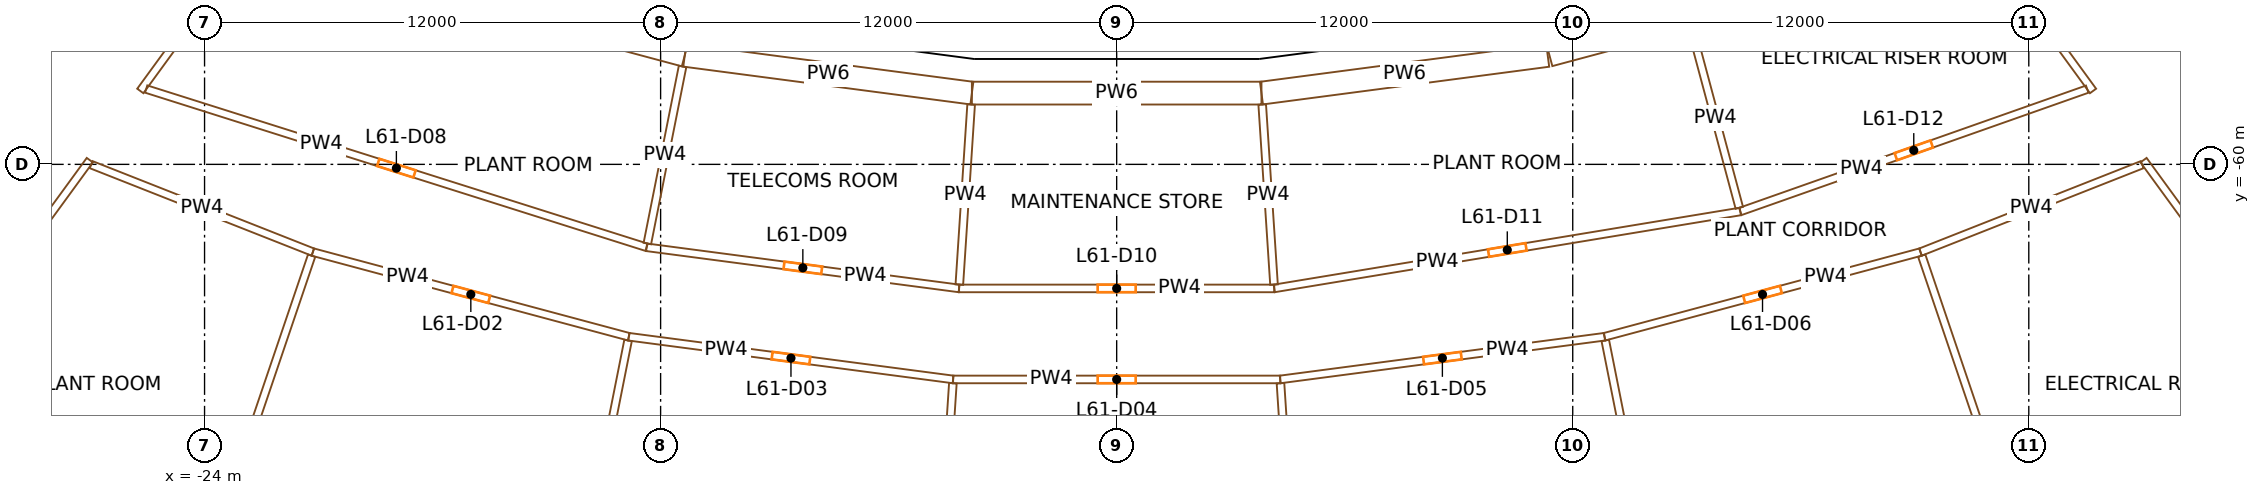
"""IFC4 building model, lengths in metres.
Left out: names, types, materials, properties, quantities, classifications, styles, units other than length and angle.
Written with IfcOpenShell. Run it as: python <this file> out.ifc"""

import sys

from ifc_helpers import new_model, si_unit, direction, frame, frame_2d, origin, origin_2d, place, context, subcontext, project, spatial, rectangle, extrude, element, fill, save


model = new_model("IFC4")
c1 = context("Model", 3, precision=1e-05, world=origin(), true_north=direction((0.0, 1.0)))
c2 = subcontext(c1, "Body", "Model", "MODEL_VIEW")
j1 = project(units=[si_unit("LENGTHUNIT", "METRE"), si_unit("PLANEANGLEUNIT", "RADIAN")], contexts=[c1])
p1 = place(None, origin())
s1 = spatial("IfcSite", under=j1, at=p1, CompositionType="ELEMENT")
p2 = place(p1, origin())
s2 = spatial("IfcBuilding", under=s1, at=p2, CompositionType="ELEMENT")
p3 = place(p2, frame((0.0, 0.0, 253.1)))
s3 = spatial("IfcBuildingStorey", under=s2, at=p3, CompositionType="ELEMENT", Elevation=253.1)
for number, where, z_axis, x_axis in (
    (1, (-11.364, -57.131, 0.0), (0.0, 0.0, 1.0), (0.981, -0.195, 0.0)),
    (2, (-3.81, -58.125, 0.0), (0.0, 0.0, 1.0), (0.998, -0.065, 0.0)),
    (3, (3.81, -58.125, 0.0), (0.0, 0.0, 1.0), (0.998, 0.065, 0.0)),
    (4, (11.364, -57.131, 0.0), (0.0, 0.0, 1.0), (0.981, 0.195, 0.0)),
):
    element("IfcColumn", number, at=place(p3, frame(where, z_axis=z_axis, x_axis=x_axis)), inside=s3, PredefinedType="COLUMN", context=c2, shape_type="SweptSolid", body=[
        extrude(rectangle(XDim=1.0, YDim=1.15, at=origin_2d()), origin(), (0.0, 0.0, 1.0), 5.0),
    ])
p4 = place(p3, frame((-3.739, -57.43, 0.0), z_axis=(0.0, 0.0, 1.0), x_axis=(-0.991446288508, 0.130515351599, 0.0)))
e5 = element("IfcWall", 5, at=p4, inside=s3, PredefinedType="SOLIDWALL", context=c2, shape_type="SweptSolid", body=[
    extrude(rectangle(XDim=7.578, YDim=0.4, at=frame_2d((3.789, 0.0))), origin(), (0.0, 0.0, 1.0), 3.6),
])
p5 = place(p3, frame((3.713, -57.427, 0.0), z_axis=(0.0, 0.0, 1.0), x_axis=(-1.0, 0.0, 0.0)))
e6 = element("IfcWall", 6, at=p5, inside=s3, PredefinedType="SOLIDWALL", context=c2, shape_type="SweptSolid", body=[
    extrude(rectangle(XDim=7.426, YDim=0.4, at=frame_2d((3.713, 0.0))), origin(), (0.0, 0.0, 1.0), 3.6),
])
p6 = place(p3, frame((11.252, -56.441, 0.0), z_axis=(0.0, 0.0, 1.0), x_axis=(-0.991446288508, -0.130515351599, 0.0)))
e7 = element("IfcWall", 7, at=p6, inside=s3, PredefinedType="SOLIDWALL", context=c2, shape_type="SweptSolid", body=[
    extrude(rectangle(XDim=7.578, YDim=0.4, at=frame_2d((3.789, 0.0))), origin(), (0.0, 0.0, 1.0), 3.6),
])
p7 = place(p3, frame((-27.019, -59.889, 0.0), z_axis=(0.0, 0.0, 1.0), x_axis=(-0.589263800386, -0.807940699281, 0.0)))
e8 = element("IfcWall", 8, at=p7, inside=s3, PredefinedType="PARTITIONING", context=c2, shape_type="SweptSolid", body=[
    extrude(rectangle(XDim=11.957, YDim=0.2, at=frame_2d((5.979, 0.0))), origin(), (0.0, 0.0, 1.0), 3.6),
])
p8 = place(p7, frame((5.479, 0.0, 0.0)))
e9 = element("IfcOpeningElement", 9, at=p8, cuts=e8, PredefinedType="OPENING", context=c2, shape_type="SweptSolid", body=[
    extrude(rectangle(XDim=1.0, YDim=2.1, at=frame_2d((0.5, 1.05))), frame((0.0, 0.11, 0.0), z_axis=(0.0, -1.0, 0.0), x_axis=(1.0, 0.0, 0.0)), (0.0, 0.0, 1.0), 0.22),
])
p9 = place(p3, frame((-26.985, -60.007, 0.0), z_axis=(0.0, 0.0, 1.0), x_axis=(0.930256649469, -0.366909479463, 0.0)))
e10 = element("IfcWall", 10, at=p9, inside=s3, PredefinedType="PARTITIONING", context=c2, shape_type="SweptSolid", body=[
    extrude(rectangle(XDim=6.271, YDim=0.2, at=frame_2d((3.136, 0.0))), origin(), (0.0, 0.0, 1.0), 3.6),
])
p10 = place(p3, frame((-25.536, -58.018, 0.0), z_axis=(0.0, 0.0, 1.0), x_axis=(0.953461291076, -0.301515449719, 0.0)))
e11 = element("IfcWall", 11, at=p10, inside=s3, PredefinedType="PARTITIONING", context=c2, shape_type="SweptSolid", body=[
    extrude(rectangle(XDim=13.811, YDim=0.2, at=frame_2d((6.905, 0.0))), origin(), (0.0, 0.0, 1.0), 3.6),
])
p11 = place(p10, frame((6.405, 0.0, 0.0)))
e12 = element("IfcOpeningElement", 12, at=p11, cuts=e11, PredefinedType="OPENING", context=c2, shape_type="SweptSolid", body=[
    extrude(rectangle(XDim=1.0, YDim=2.1, at=frame_2d((0.5, 1.05))), frame((0.0, 0.11, 0.0), z_axis=(0.0, -1.0, 0.0), x_axis=(1.0, 0.0, 0.0)), (0.0, 0.0, 1.0), 0.22),
])
p12 = place(p3, frame((-24.896, -73.34, 0.0), z_axis=(0.0, 0.0, 1.0), x_axis=(0.321435459645, 0.946931489223, 0.0)))
e13 = element("IfcWall", 13, at=p12, inside=s3, PredefinedType="PARTITIONING", context=c2, shape_type="SweptSolid", body=[
    extrude(rectangle(XDim=11.55, YDim=0.2, at=frame_2d((5.775, 0.0))), origin(), (0.0, 0.0, 1.0), 3.6),
])
p13 = place(p3, frame((-22.621, -53.86, 0.0), z_axis=(0.0, 0.0, 1.0), x_axis=(-0.589260761918, -0.80794291535, 0.0)))
e14 = element("IfcWall", 14, at=p13, inside=s3, PredefinedType="PARTITIONING", context=c2, shape_type="SweptSolid", body=[
    extrude(rectangle(XDim=5.209, YDim=0.2, at=frame_2d((2.604, 0.0))), origin(), (0.0, 0.0, 1.0), 3.6),
])
p14 = place(p3, frame((-12.837, -64.536, 0.0), z_axis=(0.0, 0.0, 1.0), x_axis=(-0.965929186451, 0.258806504483, 0.0)))
e15 = element("IfcWall", 15, at=p14, inside=s3, PredefinedType="PARTITIONING", context=c2, shape_type="SweptSolid", body=[
    extrude(rectangle(XDim=8.607, YDim=0.2, at=frame_2d((4.303, 0.0))), origin(), (0.0, 0.0, 1.0), 3.6),
])
p15 = place(p14, frame((3.803, 0.0, 0.0)))
e16 = element("IfcOpeningElement", 16, at=p15, cuts=e15, PredefinedType="OPENING", context=c2, shape_type="SweptSolid", body=[
    extrude(rectangle(XDim=1.0, YDim=2.1, at=frame_2d((0.5, 1.05))), frame((0.0, 0.11, 0.0), z_axis=(0.0, -1.0, 0.0), x_axis=(1.0, 0.0, 0.0)), (0.0, 0.0, 1.0), 0.22),
])
p16 = place(p3, frame((-18.702, -55.165, 0.0), z_axis=(0.0, 0.0, 1.0), x_axis=(0.965921655755, -0.258834609245, 0.0)))
e17 = element("IfcWall", 17, at=p16, inside=s3, PredefinedType="PARTITIONING", context=c2, shape_type="SweptSolid", body=[
    extrude(rectangle(XDim=7.597, YDim=0.6, at=frame_2d((3.798, 0.0))), origin(), (0.0, 0.0, 1.0), 3.6),
])
p17 = place(p3, frame((-15.11, -75.962, 0.0), z_axis=(0.0, 0.0, 1.0), x_axis=(0.195099800341, 0.980783394999, 0.0)))
e18 = element("IfcWall", 18, at=p17, inside=s3, PredefinedType="PARTITIONING", context=c2, shape_type="SweptSolid", body=[
    extrude(rectangle(XDim=11.55, YDim=0.2, at=frame_2d((5.775, 0.0))), origin(), (0.0, 0.0, 1.0), 3.6),
])
p18 = place(p3, frame((-4.303, -65.659, 0.0), z_axis=(0.0, 0.0, 1.0), x_axis=(-0.991443575654, 0.130535957862, 0.0)))
e19 = element("IfcWall", 19, at=p18, inside=s3, PredefinedType="PARTITIONING", context=c2, shape_type="SweptSolid", body=[
    extrude(rectangle(XDim=8.607, YDim=0.2, at=frame_2d((4.304, 0.0))), origin(), (0.0, 0.0, 1.0), 3.6),
])
p19 = place(p18, frame((3.803, 0.0, 0.0)))
e20 = element("IfcOpeningElement", 20, at=p19, cuts=e19, PredefinedType="OPENING", context=c2, shape_type="SweptSolid", body=[
    extrude(rectangle(XDim=1.0, YDim=2.1, at=frame_2d((0.5, 1.05))), frame((0.0, 0.11, 0.0), z_axis=(0.0, -1.0, 0.0), x_axis=(1.0, 0.0, 0.0)), (0.0, 0.0, 1.0), 0.22),
])
p20 = place(p3, frame((-12.369, -62.182, 0.0), z_axis=(0.0, 0.0, 1.0), x_axis=(0.991447881484, -0.130503250152, 0.0)))
e21 = element("IfcWall", 21, at=p20, inside=s3, PredefinedType="PARTITIONING", context=c2, shape_type="SweptSolid", body=[
    extrude(rectangle(XDim=8.293, YDim=0.2, at=frame_2d((4.146, 0.0))), origin(), (0.0, 0.0, 1.0), 3.6),
])
p21 = place(p20, frame((3.646, 0.0, 0.0)))
e22 = element("IfcOpeningElement", 22, at=p21, cuts=e21, PredefinedType="OPENING", context=c2, shape_type="SweptSolid", body=[
    extrude(rectangle(XDim=1.0, YDim=2.1, at=frame_2d((0.5, 1.05))), frame((0.0, 0.11, 0.0), z_axis=(0.0, -1.0, 0.0), x_axis=(1.0, 0.0, 0.0)), (0.0, 0.0, 1.0), 0.22),
])
p22 = place(p3, frame((-11.423, -57.425, 0.0), z_axis=(0.0, 0.0, 1.0), x_axis=(-0.195058392203, -0.980791631098, 0.0)))
e23 = element("IfcWall", 23, at=p22, inside=s3, PredefinedType="PARTITIONING", context=c2, shape_type="SweptSolid", body=[
    extrude(rectangle(XDim=4.75, YDim=0.2, at=frame_2d((2.375, 0.0))), origin(), (0.0, 0.0, 1.0), 3.6),
])
p23 = place(p3, frame((-11.364, -57.131, 0.0), z_axis=(0.0, 0.0, 1.0), x_axis=(0.99144731422, -0.130507559654, 0.0)))
e24 = element("IfcWall", 24, at=p23, inside=s3, PredefinedType="PARTITIONING", context=c2, shape_type="SweptSolid", body=[
    extrude(rectangle(XDim=7.619, YDim=0.6, at=frame_2d((3.81, 0.0))), origin(), (0.0, 0.0, 1.0), 3.6),
])
p24 = place(p3, frame((-5.065, -77.284, 0.0), z_axis=(0.0, 0.0, 1.0), x_axis=(0.065399429308, 0.997859165737, 0.0)))
e25 = element("IfcWall", 25, at=p24, inside=s3, PredefinedType="PARTITIONING", context=c2, shape_type="SweptSolid", body=[
    extrude(rectangle(XDim=11.55, YDim=0.2, at=frame_2d((5.775, 0.0))), origin(), (0.0, 0.0, 1.0), 3.6),
])
p25 = place(p3, frame((4.303, -65.659, 0.0), z_axis=(0.0, 0.0, 1.0), x_axis=(-1.0, 0.0, 0.0)))
e26 = element("IfcWall", 26, at=p25, inside=s3, PredefinedType="PARTITIONING", context=c2, shape_type="SweptSolid", body=[
    extrude(rectangle(XDim=8.607, YDim=0.2, at=frame_2d((4.303, 0.0))), origin(), (0.0, 0.0, 1.0), 3.6),
])
p26 = place(p25, frame((3.803, 0.0, 0.0)))
e27 = element("IfcOpeningElement", 27, at=p26, cuts=e26, PredefinedType="OPENING", context=c2, shape_type="SweptSolid", body=[
    extrude(rectangle(XDim=1.0, YDim=2.1, at=frame_2d((0.5, 1.05))), frame((0.0, 0.11, 0.0), z_axis=(0.0, -1.0, 0.0), x_axis=(1.0, 0.0, 0.0)), (0.0, 0.0, 1.0), 0.22),
])
p27 = place(p3, frame((-4.146, -63.264, 0.0), z_axis=(0.0, 0.0, 1.0), x_axis=(1.0, 0.0, 0.0)))
e28 = element("IfcWall", 28, at=p27, inside=s3, PredefinedType="PARTITIONING", context=c2, shape_type="SweptSolid", body=[
    extrude(rectangle(XDim=8.293, YDim=0.2, at=frame_2d((4.146, 0.0))), origin(), (0.0, 0.0, 1.0), 3.6),
])
p28 = place(p27, frame((3.646, 0.0, 0.0)))
e29 = element("IfcOpeningElement", 29, at=p28, cuts=e28, PredefinedType="OPENING", context=c2, shape_type="SweptSolid", body=[
    extrude(rectangle(XDim=1.0, YDim=2.1, at=frame_2d((0.5, 1.05))), frame((0.0, 0.11, 0.0), z_axis=(0.0, -1.0, 0.0), x_axis=(1.0, 0.0, 0.0)), (0.0, 0.0, 1.0), 0.22),
])
p29 = place(p3, frame((-3.829, -58.425, 0.0), z_axis=(0.0, 0.0, 1.0), x_axis=(-0.065427369886, -0.997857334126, 0.0)))
e30 = element("IfcWall", 30, at=p29, inside=s3, PredefinedType="PARTITIONING", context=c2, shape_type="SweptSolid", body=[
    extrude(rectangle(XDim=4.75, YDim=0.2, at=frame_2d((2.375, 0.0))), origin(), (0.0, 0.0, 1.0), 3.6),
])
p30 = place(p3, frame((-3.81, -58.125, 0.0), z_axis=(0.0, 0.0, 1.0), x_axis=(1.0, 0.0, 0.0)))
e31 = element("IfcWall", 31, at=p30, inside=s3, PredefinedType="PARTITIONING", context=c2, shape_type="SweptSolid", body=[
    extrude(rectangle(XDim=7.62, YDim=0.6, at=frame_2d((3.81, 0.0))), origin(), (0.0, 0.0, 1.0), 3.6),
])
p31 = place(p3, frame((3.829, -58.425, 0.0), z_axis=(0.0, 0.0, 1.0), x_axis=(0.065427369886, -0.997857334126, 0.0)))
e32 = element("IfcWall", 32, at=p31, inside=s3, PredefinedType="PARTITIONING", context=c2, shape_type="SweptSolid", body=[
    extrude(rectangle(XDim=4.75, YDim=0.2, at=frame_2d((2.375, 0.0))), origin(), (0.0, 0.0, 1.0), 3.6),
])
p32 = place(p3, frame((3.81, -58.125, 0.0), z_axis=(0.0, 0.0, 1.0), x_axis=(0.99144685567, 0.13051104314, 0.0)))
e33 = element("IfcWall", 33, at=p32, inside=s3, PredefinedType="PARTITIONING", context=c2, shape_type="SweptSolid", body=[
    extrude(rectangle(XDim=7.597, YDim=0.6, at=frame_2d((3.798, 0.0))), origin(), (0.0, 0.0, 1.0), 3.6),
])
p33 = place(p3, frame((4.146, -63.264, 0.0), z_axis=(0.0, 0.0, 1.0), x_axis=(0.986645467323, 0.162882539919, 0.0)))
e34 = element("IfcWall", 34, at=p33, inside=s3, PredefinedType="PARTITIONING", context=c2, shape_type="SweptSolid", body=[
    extrude(rectangle(XDim=12.429, YDim=0.2, at=frame_2d((6.214, 0.0))), origin(), (0.0, 0.0, 1.0), 3.6),
])
p34 = place(p33, frame((5.714, 0.0, 0.0)))
e35 = element("IfcOpeningElement", 35, at=p34, cuts=e34, PredefinedType="OPENING", context=c2, shape_type="SweptSolid", body=[
    extrude(rectangle(XDim=1.0, YDim=2.1, at=frame_2d((0.5, 1.05))), frame((0.0, 0.11, 0.0), z_axis=(0.0, -1.0, 0.0), x_axis=(1.0, 0.0, 0.0)), (0.0, 0.0, 1.0), 0.22),
])
p35 = place(p3, frame((12.837, -64.536, 0.0), z_axis=(0.0, 0.0, 1.0), x_axis=(-0.991443575654, -0.130535957862, 0.0)))
e36 = element("IfcWall", 36, at=p35, inside=s3, PredefinedType="PARTITIONING", context=c2, shape_type="SweptSolid", body=[
    extrude(rectangle(XDim=8.607, YDim=0.2, at=frame_2d((4.304, 0.0))), origin(), (0.0, 0.0, 1.0), 3.6),
])
p36 = place(p35, frame((3.803, 0.0, 0.0)))
e37 = element("IfcOpeningElement", 37, at=p36, cuts=e36, PredefinedType="OPENING", context=c2, shape_type="SweptSolid", body=[
    extrude(rectangle(XDim=1.0, YDim=2.1, at=frame_2d((0.5, 1.05))), frame((0.0, 0.11, 0.0), z_axis=(0.0, -1.0, 0.0), x_axis=(1.0, 0.0, 0.0)), (0.0, 0.0, 1.0), 0.22),
])
p37 = place(p3, frame((5.065, -77.284, 0.0), z_axis=(0.0, 0.0, 1.0), x_axis=(-0.065399429308, 0.997859165737, 0.0)))
e38 = element("IfcWall", 38, at=p37, inside=s3, PredefinedType="PARTITIONING", context=c2, shape_type="SweptSolid", body=[
    extrude(rectangle(XDim=11.55, YDim=0.2, at=frame_2d((5.775, 0.0))), origin(), (0.0, 0.0, 1.0), 3.6),
])
p38 = place(p3, frame((11.386, -57.125, 0.0), z_axis=(0.0, 0.0, 1.0), x_axis=(0.965936829447, 0.258777977267, 0.0)))
e39 = element("IfcWall", 39, at=p38, inside=s3, PredefinedType="PARTITIONING", context=c2, shape_type="SweptSolid", body=[
    extrude(rectangle(XDim=3.787, YDim=0.6, at=frame_2d((1.894, 0.0))), origin(), (0.0, 0.0, 1.0), 3.6),
])
p39 = place(p3, frame((21.151, -62.308, 0.0), z_axis=(0.0, 0.0, 1.0), x_axis=(-0.965929186451, -0.258806504483, 0.0)))
e40 = element("IfcWall", 40, at=p39, inside=s3, PredefinedType="PARTITIONING", context=c2, shape_type="SweptSolid", body=[
    extrude(rectangle(XDim=8.607, YDim=0.2, at=frame_2d((4.303, 0.0))), origin(), (0.0, 0.0, 1.0), 3.6),
])
p40 = place(p39, frame((3.803, 0.0, 0.0)))
e41 = element("IfcOpeningElement", 41, at=p40, cuts=e40, PredefinedType="OPENING", context=c2, shape_type="SweptSolid", body=[
    extrude(rectangle(XDim=1.0, YDim=2.1, at=frame_2d((0.5, 1.05))), frame((0.0, 0.11, 0.0), z_axis=(0.0, -1.0, 0.0), x_axis=(1.0, 0.0, 0.0)), (0.0, 0.0, 1.0), 0.22),
])
p41 = place(p3, frame((15.122, -56.435, 0.0), z_axis=(0.0, 0.0, 1.0), x_axis=(0.258834553275, -0.965921670753, 0.0)))
e42 = element("IfcWall", 42, at=p41, inside=s3, PredefinedType="PARTITIONING", context=c2, shape_type="SweptSolid", body=[
    extrude(rectangle(XDim=4.875, YDim=0.2, at=frame_2d((2.437, 0.0))), origin(), (0.0, 0.0, 1.0), 3.6),
])
p42 = place(p3, frame((15.11, -75.962, 0.0), z_axis=(0.0, 0.0, 1.0), x_axis=(-0.195099800341, 0.980783394999, 0.0)))
e43 = element("IfcWall", 43, at=p42, inside=s3, PredefinedType="PARTITIONING", context=c2, shape_type="SweptSolid", body=[
    extrude(rectangle(XDim=11.55, YDim=0.2, at=frame_2d((5.775, 0.0))), origin(), (0.0, 0.0, 1.0), 3.6),
])
p43 = place(p3, frame((16.409, -61.24, 0.0), z_axis=(0.0, 0.0, 1.0), x_axis=(0.943086221811, 0.332548309619, 0.0)))
e44 = element("IfcWall", 44, at=p43, inside=s3, PredefinedType="PARTITIONING", context=c2, shape_type="SweptSolid", body=[
    extrude(rectangle(XDim=9.679, YDim=0.2, at=frame_2d((4.839, 0.0))), origin(), (0.0, 0.0, 1.0), 3.6),
])
p44 = place(p43, frame((4.34, 0.0, 0.0)))
e45 = element("IfcOpeningElement", 45, at=p44, cuts=e44, PredefinedType="OPENING", context=c2, shape_type="SweptSolid", body=[
    extrude(rectangle(XDim=1.0, YDim=2.1, at=frame_2d((0.5, 1.05))), frame((0.0, 0.11, 0.0), z_axis=(0.0, -1.0, 0.0), x_axis=(1.0, 0.0, 0.0)), (0.0, 0.0, 1.0), 0.22),
])
p45 = place(p3, frame((21.151, -62.308, 0.0), z_axis=(0.0, 0.0, 1.0), x_axis=(0.930256649469, 0.366909479463, 0.0)))
e46 = element("IfcWall", 46, at=p45, inside=s3, PredefinedType="PARTITIONING", context=c2, shape_type="SweptSolid", body=[
    extrude(rectangle(XDim=6.271, YDim=0.2, at=frame_2d((3.136, 0.0))), origin(), (0.0, 0.0, 1.0), 3.6),
])
p46 = place(p3, frame((22.621, -53.86, 0.0), z_axis=(0.0, 0.0, 1.0), x_axis=(0.589260761918, -0.80794291535, 0.0)))
e47 = element("IfcWall", 47, at=p46, inside=s3, PredefinedType="PARTITIONING", context=c2, shape_type="SweptSolid", body=[
    extrude(rectangle(XDim=5.209, YDim=0.2, at=frame_2d((2.604, 0.0))), origin(), (0.0, 0.0, 1.0), 3.6),
])
p47 = place(p3, frame((24.896, -73.34, 0.0), z_axis=(0.0, 0.0, 1.0), x_axis=(-0.321435459645, 0.946931489223, 0.0)))
e48 = element("IfcWall", 48, at=p47, inside=s3, PredefinedType="PARTITIONING", context=c2, shape_type="SweptSolid", body=[
    extrude(rectangle(XDim=11.55, YDim=0.2, at=frame_2d((5.775, 0.0))), origin(), (0.0, 0.0, 1.0), 3.6),
])
p48 = place(p3, frame((34.065, -69.55, 0.0), z_axis=(0.0, 0.0, 1.0), x_axis=(-0.589263800386, 0.807940699281, 0.0)))
e49 = element("IfcWall", 49, at=p48, inside=s3, PredefinedType="PARTITIONING", context=c2, shape_type="SweptSolid", body=[
    extrude(rectangle(XDim=11.957, YDim=0.2, at=frame_2d((5.979, 0.0))), origin(), (0.0, 0.0, 1.0), 3.6),
])
p49 = place(p48, frame((5.479, 0.0, 0.0)))
e50 = element("IfcOpeningElement", 50, at=p49, cuts=e49, PredefinedType="OPENING", context=c2, shape_type="SweptSolid", body=[
    extrude(rectangle(XDim=1.0, YDim=2.1, at=frame_2d((0.5, 1.05))), frame((0.0, 0.11, 0.0), z_axis=(0.0, -1.0, 0.0), x_axis=(1.0, 0.0, 0.0)), (0.0, 0.0, 1.0), 0.22),
])
p50 = place(p15, origin())
e51 = element("IfcDoor", 51, at=p50, inside=s3, OperationType="SINGLE_SWING_RIGHT", PredefinedType="DOOR", context=c2, shape_type="SweptSolid", body=[
    extrude(rectangle(XDim=1.0, YDim=2.1, at=frame_2d((0.5, 1.05))), frame((0.0, 0.025, 0.0), z_axis=(0.0, -1.0, 0.0), x_axis=(1.0, 0.0, 0.0)), (0.0, 0.0, 1.0), 0.05),
])
fill(e16, e51)
p51 = place(p19, origin())
e52 = element("IfcDoor", 52, at=p51, inside=s3, OperationType="SINGLE_SWING_RIGHT", PredefinedType="DOOR", context=c2, shape_type="SweptSolid", body=[
    extrude(rectangle(XDim=1.0, YDim=2.1, at=frame_2d((0.5, 1.05))), frame((0.0, 0.025, 0.0), z_axis=(0.0, -1.0, 0.0), x_axis=(1.0, 0.0, 0.0)), (0.0, 0.0, 1.0), 0.05),
])
fill(e20, e52)
p52 = place(p26, origin())
e53 = element("IfcDoor", 53, at=p52, inside=s3, OperationType="SINGLE_SWING_RIGHT", PredefinedType="DOOR", context=c2, shape_type="SweptSolid", body=[
    extrude(rectangle(XDim=1.0, YDim=2.1, at=frame_2d((0.5, 1.05))), frame((0.0, 0.025, 0.0), z_axis=(0.0, -1.0, 0.0), x_axis=(1.0, 0.0, 0.0)), (0.0, 0.0, 1.0), 0.05),
])
fill(e27, e53)
p53 = place(p36, origin())
e54 = element("IfcDoor", 54, at=p53, inside=s3, OperationType="SINGLE_SWING_RIGHT", PredefinedType="DOOR", context=c2, shape_type="SweptSolid", body=[
    extrude(rectangle(XDim=1.0, YDim=2.1, at=frame_2d((0.5, 1.05))), frame((0.0, 0.025, 0.0), z_axis=(0.0, -1.0, 0.0), x_axis=(1.0, 0.0, 0.0)), (0.0, 0.0, 1.0), 0.05),
])
fill(e37, e54)
p54 = place(p40, origin())
e55 = element("IfcDoor", 55, at=p54, inside=s3, OperationType="SINGLE_SWING_RIGHT", PredefinedType="DOOR", context=c2, shape_type="SweptSolid", body=[
    extrude(rectangle(XDim=1.0, YDim=2.1, at=frame_2d((0.5, 1.05))), frame((0.0, 0.025, 0.0), z_axis=(0.0, -1.0, 0.0), x_axis=(1.0, 0.0, 0.0)), (0.0, 0.0, 1.0), 0.05),
])
fill(e41, e55)
p55 = place(p11, origin())
e56 = element("IfcDoor", 56, at=p55, inside=s3, OperationType="SINGLE_SWING_RIGHT", PredefinedType="DOOR", context=c2, shape_type="SweptSolid", body=[
    extrude(rectangle(XDim=1.0, YDim=2.1, at=frame_2d((0.5, 1.05))), frame((0.0, 0.025, 0.0), z_axis=(0.0, -1.0, 0.0), x_axis=(1.0, 0.0, 0.0)), (0.0, 0.0, 1.0), 0.05),
])
fill(e12, e56)
p56 = place(p21, origin())
e57 = element("IfcDoor", 57, at=p56, inside=s3, OperationType="SINGLE_SWING_RIGHT", PredefinedType="DOOR", context=c2, shape_type="SweptSolid", body=[
    extrude(rectangle(XDim=1.0, YDim=2.1, at=frame_2d((0.5, 1.05))), frame((0.0, 0.025, 0.0), z_axis=(0.0, -1.0, 0.0), x_axis=(1.0, 0.0, 0.0)), (0.0, 0.0, 1.0), 0.05),
])
fill(e22, e57)
p57 = place(p28, origin())
e58 = element("IfcDoor", 58, at=p57, inside=s3, OperationType="SINGLE_SWING_RIGHT", PredefinedType="DOOR", context=c2, shape_type="SweptSolid", body=[
    extrude(rectangle(XDim=1.0, YDim=2.1, at=frame_2d((0.5, 1.05))), frame((0.0, 0.025, 0.0), z_axis=(0.0, -1.0, 0.0), x_axis=(1.0, 0.0, 0.0)), (0.0, 0.0, 1.0), 0.05),
])
fill(e29, e58)
p58 = place(p34, origin())
e59 = element("IfcDoor", 59, at=p58, inside=s3, OperationType="SINGLE_SWING_RIGHT", PredefinedType="DOOR", context=c2, shape_type="SweptSolid", body=[
    extrude(rectangle(XDim=1.0, YDim=2.1, at=frame_2d((0.5, 1.05))), frame((0.0, 0.025, 0.0), z_axis=(0.0, -1.0, 0.0), x_axis=(1.0, 0.0, 0.0)), (0.0, 0.0, 1.0), 0.05),
])
fill(e35, e59)
p59 = place(p44, origin())
e60 = element("IfcDoor", 60, at=p59, inside=s3, OperationType="SINGLE_SWING_RIGHT", PredefinedType="DOOR", context=c2, shape_type="SweptSolid", body=[
    extrude(rectangle(XDim=1.0, YDim=2.1, at=frame_2d((0.5, 1.05))), frame((0.0, 0.025, 0.0), z_axis=(0.0, -1.0, 0.0), x_axis=(1.0, 0.0, 0.0)), (0.0, 0.0, 1.0), 0.05),
])
fill(e45, e60)
save(model, sys.argv[1])
